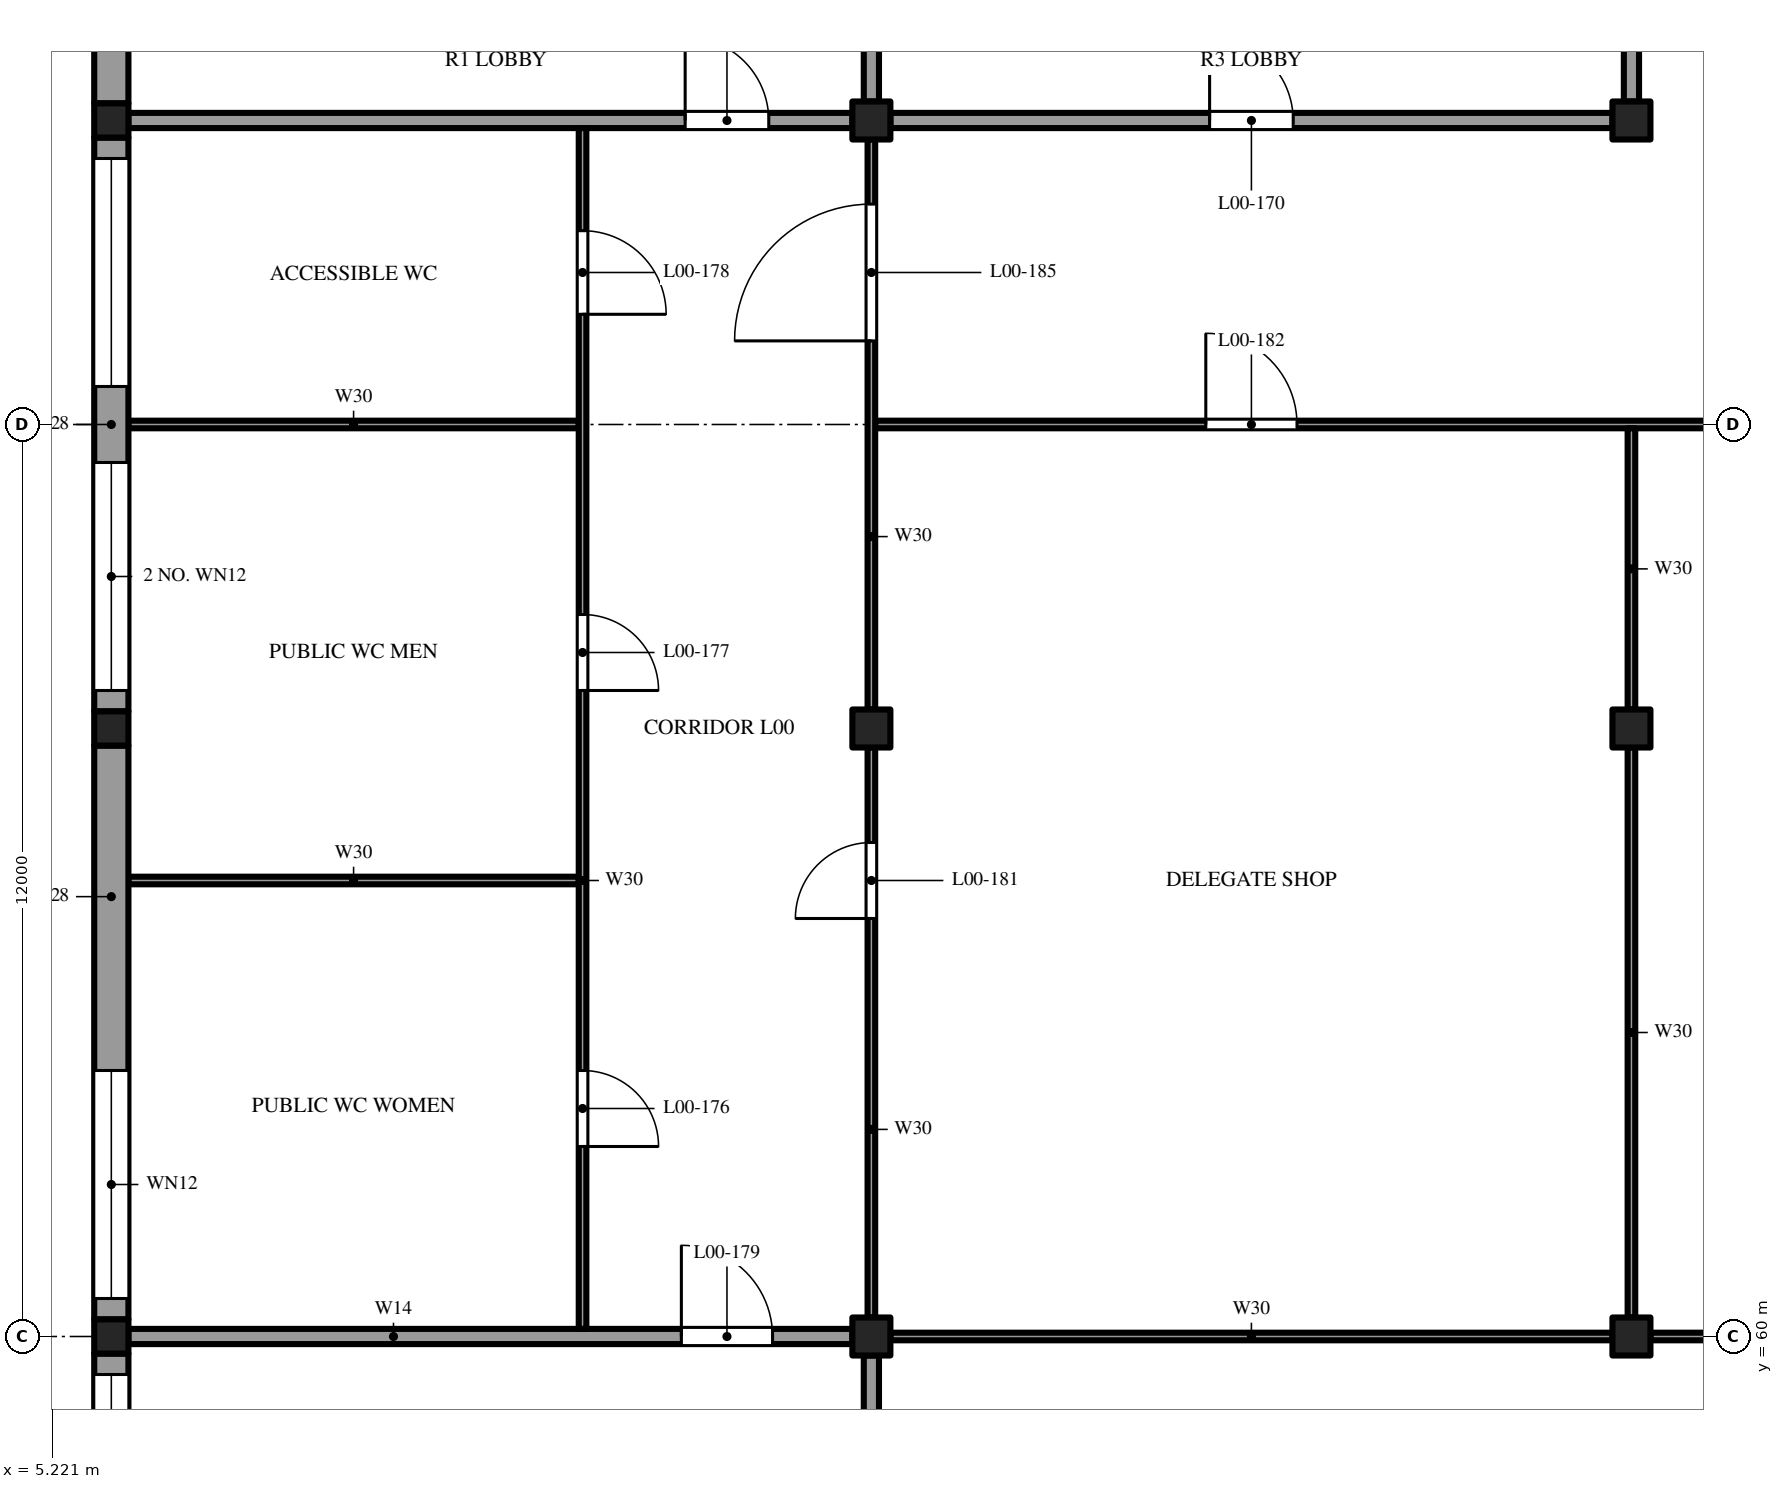
"""IFC4 building model, lengths in metres.
Left out: names, types, materials, properties, quantities, classifications, styles, units other than length and angle.
Written with IfcOpenShell. Run it as: python <this file> out.ifc"""

import sys

from ifc_helpers import new_model, si_unit, direction, frame, frame_2d, origin, origin_2d, place, context, subcontext, project, spatial, rectangle, extrude, element, fill, save


model = new_model("IFC4")
c1 = context("Model", 3, precision=1e-05, world=origin(), true_north=direction((0.0, 1.0)))
c2 = subcontext(c1, "Body", "Model", "MODEL_VIEW")
j1 = project(units=[si_unit("LENGTHUNIT", "METRE"), si_unit("PLANEANGLEUNIT", "RADIAN")], contexts=[c1])
p1 = place(None, origin())
s1 = spatial("IfcSite", under=j1, at=p1, CompositionType="ELEMENT")
p2 = place(p1, origin())
s2 = spatial("IfcBuilding", under=s1, at=p2, CompositionType="ELEMENT")
p3 = place(p2, origin())
s3 = spatial("IfcBuildingStorey", under=s2, at=p3, CompositionType="ELEMENT", Elevation=0.0)
for number, where, z_axis, x_axis in (
    (1, (6.0, 60.0, -0.4), (0.0, 0.0, 1.0), (1.0, 0.0, 0.0)),
    (2, (6.0, 68.0, -0.4), (0.0, 0.0, 1.0), (1.0, 0.0, 0.0)),
    (3, (6.0, 76.0, -0.4), (0.0, 0.0, 1.0), (1.0, 0.0, 0.0)),
):
    element("IfcColumn", number, at=place(p3, frame(where, z_axis=z_axis, x_axis=x_axis)), inside=s3, PredefinedType="COLUMN", context=c2, shape_type="SweptSolid", body=[
        extrude(rectangle(XDim=0.45, YDim=0.45, at=origin_2d()), origin(), (0.0, 0.0, 1.0), 7.6),
    ])
for number, where, z_axis, x_axis in (
    (4, (16.0, 60.0, -0.4), (0.0, 0.0, 1.0), (1.0, 0.0, 0.0)),
    (5, (16.0, 68.0, -0.4), (0.0, 0.0, 1.0), (1.0, 0.0, 0.0)),
    (6, (16.0, 76.0, -0.4), (0.0, 0.0, 1.0), (1.0, 0.0, 0.0)),
    (7, (26.0, 60.0, -0.4), (0.0, 0.0, 1.0), (1.0, 0.0, 0.0)),
    (8, (26.0, 68.0, -0.4), (0.0, 0.0, 1.0), (1.0, 0.0, 0.0)),
    (9, (26.0, 76.0, -0.4), (0.0, 0.0, 1.0), (1.0, 0.0, 0.0)),
):
    element("IfcColumn", number, at=place(p3, frame(where, z_axis=z_axis, x_axis=x_axis)), inside=s3, PredefinedType="COLUMN", context=c2, shape_type="SweptSolid", body=[
        extrude(rectangle(XDim=0.5, YDim=0.5, at=origin_2d()), origin(), (0.0, 0.0, 1.0), 7.6),
    ])
p4 = place(p3, frame((6.225, 60.0, 0.0), z_axis=(0.0, 0.0, 1.0), x_axis=(1.0, 0.0, 0.0)))
e10 = element("IfcWall", 10, at=p4, inside=s3, PredefinedType="SOLIDWALL", context=c2, shape_type="SweptSolid", body=[
    extrude(rectangle(XDim=9.525, YDim=0.2, at=frame_2d((4.762, 0.0))), origin(), (0.0, 0.0, 1.0), 6.85),
])
p5 = place(p4, frame((7.275, 0.0, 0.0)))
e11 = element("IfcOpeningElement", 11, at=p5, cuts=e10, PredefinedType="OPENING", context=c2, shape_type="SweptSolid", body=[
    extrude(rectangle(XDim=1.2, YDim=2.1, at=frame_2d((0.6, 1.05))), frame((0.0, 0.11, 0.0), z_axis=(0.0, -1.0, 0.0), x_axis=(1.0, 0.0, 0.0)), (0.0, 0.0, 1.0), 0.22),
])
for number, where, z_axis, x_axis in (
    (12, (16.25, 60.0, 0.0), (0.0, 0.0, 1.0), (1.0, 0.0, 0.0)),
    (13, (26.25, 60.0, 0.0), (0.0, 0.0, 1.0), (1.0, 0.0, 0.0)),
):
    element("IfcWall", number, at=place(p3, frame(where, z_axis=z_axis, x_axis=x_axis)), inside=s3, PredefinedType="PARTITIONING", context=c2, shape_type="SweptSolid", body=[
        extrude(rectangle(XDim=9.5, YDim=0.1, at=frame_2d((4.75, 0.0))), origin(), (0.0, 0.0, 1.0), 6.85),
    ])
for number, where, z_axis, x_axis in (
    (14, (6.225, 66.0, 0.0), (0.0, 0.0, 1.0), (1.0, 0.0, 0.0)),
    (15, (6.225, 72.0, 0.0), (0.0, 0.0, 1.0), (1.0, 0.0, 0.0)),
):
    element("IfcWall", number, at=place(p3, frame(where, z_axis=z_axis, x_axis=x_axis)), inside=s3, PredefinedType="PARTITIONING", context=c2, shape_type="SweptSolid", body=[
        extrude(rectangle(XDim=5.925, YDim=0.1, at=frame_2d((2.962, 0.0))), origin(), (0.0, 0.0, 1.0), 6.85),
    ])
p6 = place(p3, frame((16.05, 72.0, 0.0), z_axis=(0.0, 0.0, 1.0), x_axis=(1.0, 0.0, 0.0)))
e16 = element("IfcWall", 16, at=p6, inside=s3, PredefinedType="PARTITIONING", context=c2, shape_type="SweptSolid", body=[
    extrude(rectangle(XDim=29.725, YDim=0.1, at=frame_2d((14.862, 0.0))), origin(), (0.0, 0.0, 1.0), 6.85),
])
p7 = place(p6, frame((4.35, 0.0, 0.0)))
e17 = element("IfcOpeningElement", 17, at=p7, cuts=e16, PredefinedType="OPENING", context=c2, shape_type="SweptSolid", body=[
    extrude(rectangle(XDim=1.2, YDim=2.1, at=frame_2d((0.6, 1.05))), frame((0.0, 0.06, 0.0), z_axis=(0.0, -1.0, 0.0), x_axis=(1.0, 0.0, 0.0)), (0.0, 0.0, 1.0), 0.12),
])
p8 = place(p6, frame((17.55, 0.0, 0.0)))
e18 = element("IfcOpeningElement", 18, at=p8, cuts=e16, PredefinedType="OPENING", context=c2, shape_type="SweptSolid", body=[
    extrude(rectangle(XDim=1.8, YDim=2.1, at=frame_2d((0.9, 1.05))), frame((0.0, 0.06, 0.0), z_axis=(0.0, -1.0, 0.0), x_axis=(1.0, 0.0, 0.0)), (0.0, 0.0, 1.0), 0.12),
])
p9 = place(p3, frame((6.225, 76.0, 0.0), z_axis=(0.0, 0.0, 1.0), x_axis=(1.0, 0.0, 0.0)))
e19 = element("IfcWall", 19, at=p9, inside=s3, PredefinedType="SOLIDWALL", context=c2, shape_type="SweptSolid", body=[
    extrude(rectangle(XDim=9.525, YDim=0.2, at=frame_2d((4.762, 0.0))), origin(), (0.0, 0.0, 1.0), 6.85),
])
p10 = place(p9, frame((7.325, 0.0, 0.0)))
e20 = element("IfcOpeningElement", 20, at=p10, cuts=e19, PredefinedType="OPENING", context=c2, shape_type="SweptSolid", body=[
    extrude(rectangle(XDim=1.1, YDim=2.1, at=frame_2d((0.55, 1.05))), frame((0.0, 0.11, 0.0), z_axis=(0.0, -1.0, 0.0), x_axis=(1.0, 0.0, 0.0)), (0.0, 0.0, 1.0), 0.22),
])
p11 = place(p3, frame((16.25, 76.0, 0.0), z_axis=(0.0, 0.0, 1.0), x_axis=(1.0, 0.0, 0.0)))
e21 = element("IfcWall", 21, at=p11, inside=s3, PredefinedType="SOLIDWALL", context=c2, shape_type="SweptSolid", body=[
    extrude(rectangle(XDim=9.5, YDim=0.2, at=frame_2d((4.75, 0.0))), origin(), (0.0, 0.0, 1.0), 6.85),
])
p12 = place(p11, frame((4.2, 0.0, 0.0)))
e22 = element("IfcOpeningElement", 22, at=p12, cuts=e21, PredefinedType="OPENING", context=c2, shape_type="SweptSolid", body=[
    extrude(rectangle(XDim=1.1, YDim=2.1, at=frame_2d((0.55, 1.05))), frame((0.0, 0.11, 0.0), z_axis=(0.0, -1.0, 0.0), x_axis=(1.0, 0.0, 0.0)), (0.0, 0.0, 1.0), 0.22),
])
p13 = place(p3, frame((6.0, 59.775, 0.0), z_axis=(0.0, 0.0, 1.0), x_axis=(0.0, -1.0, 0.0)))
e23 = element("IfcWall", 23, at=p13, inside=s3, PredefinedType="SOLIDWALL", context=c2, shape_type="SweptSolid", body=[
    extrude(rectangle(XDim=7.55, YDim=0.45, at=frame_2d((3.775, 0.0))), origin(), (0.0, 0.0, 1.0), 6.85),
])
p14 = place(p13, frame((4.275, 0.0, 1.0)))
e24 = element("IfcOpeningElement", 24, at=p14, cuts=e23, PredefinedType="OPENING", context=c2, shape_type="SweptSolid", body=[
    extrude(rectangle(XDim=3.0, YDim=4.0, at=frame_2d((1.5, 2.0))), frame((0.0, 0.235, 0.0), z_axis=(0.0, -1.0, 0.0), x_axis=(1.0, 0.0, 0.0)), (0.0, 0.0, 1.0), 0.47),
])
p15 = place(p13, frame((0.275, 0.0, 1.0)))
e25 = element("IfcOpeningElement", 25, at=p15, cuts=e23, PredefinedType="OPENING", context=c2, shape_type="SweptSolid", body=[
    extrude(rectangle(XDim=3.0, YDim=4.0, at=frame_2d((1.5, 2.0))), frame((0.0, 0.235, 0.0), z_axis=(0.0, -1.0, 0.0), x_axis=(1.0, 0.0, 0.0)), (0.0, 0.0, 1.0), 0.47),
])
p16 = place(p3, frame((6.0, 67.775, 0.0), z_axis=(0.0, 0.0, 1.0), x_axis=(0.0, -1.0, 0.0)))
e26 = element("IfcWall", 26, at=p16, inside=s3, PredefinedType="SOLIDWALL", context=c2, shape_type="SweptSolid", body=[
    extrude(rectangle(XDim=7.55, YDim=0.45, at=frame_2d((3.775, 0.0))), origin(), (0.0, 0.0, 1.0), 6.85),
])
p17 = place(p16, frame((4.275, 0.0, 1.0)))
e27 = element("IfcOpeningElement", 27, at=p17, cuts=e26, PredefinedType="OPENING", context=c2, shape_type="SweptSolid", body=[
    extrude(rectangle(XDim=3.0, YDim=4.0, at=frame_2d((1.5, 2.0))), frame((0.0, 0.235, 0.0), z_axis=(0.0, -1.0, 0.0), x_axis=(1.0, 0.0, 0.0)), (0.0, 0.0, 1.0), 0.47),
])
p18 = place(p3, frame((6.0, 75.775, 0.0), z_axis=(0.0, 0.0, 1.0), x_axis=(0.0, -1.0, 0.0)))
e28 = element("IfcWall", 28, at=p18, inside=s3, PredefinedType="SOLIDWALL", context=c2, shape_type="SweptSolid", body=[
    extrude(rectangle(XDim=7.55, YDim=0.45, at=frame_2d((3.775, 0.0))), origin(), (0.0, 0.0, 1.0), 6.85),
])
p19 = place(p18, frame((4.275, 0.0, 1.0)))
e29 = element("IfcOpeningElement", 29, at=p19, cuts=e28, PredefinedType="OPENING", context=c2, shape_type="SweptSolid", body=[
    extrude(rectangle(XDim=3.0, YDim=4.0, at=frame_2d((1.5, 2.0))), frame((0.0, 0.235, 0.0), z_axis=(0.0, -1.0, 0.0), x_axis=(1.0, 0.0, 0.0)), (0.0, 0.0, 1.0), 0.47),
])
p20 = place(p18, frame((0.275, 0.0, 1.0)))
e30 = element("IfcOpeningElement", 30, at=p20, cuts=e28, PredefinedType="OPENING", context=c2, shape_type="SweptSolid", body=[
    extrude(rectangle(XDim=3.0, YDim=4.0, at=frame_2d((1.5, 2.0))), frame((0.0, 0.235, 0.0), z_axis=(0.0, -1.0, 0.0), x_axis=(1.0, 0.0, 0.0)), (0.0, 0.0, 1.0), 0.47),
])
p21 = place(p3, frame((6.0, 83.775, 0.0), z_axis=(0.0, 0.0, 1.0), x_axis=(0.0, -1.0, 0.0)))
e31 = element("IfcWall", 31, at=p21, inside=s3, PredefinedType="SOLIDWALL", context=c2, shape_type="SweptSolid", body=[
    extrude(rectangle(XDim=7.55, YDim=0.45, at=frame_2d((3.775, 0.0))), origin(), (0.0, 0.0, 1.0), 6.85),
])
p22 = place(p3, frame((12.2, 60.1, 0.0), z_axis=(0.0, 0.0, 1.0), x_axis=(0.0, 1.0, 0.0)))
e32 = element("IfcWall", 32, at=p22, inside=s3, PredefinedType="PARTITIONING", context=c2, shape_type="SweptSolid", body=[
    extrude(rectangle(XDim=15.8, YDim=0.1, at=frame_2d((7.9, 0.0))), origin(), (0.0, 0.0, 1.0), 6.85),
])
p23 = place(p22, frame((2.4, 0.0, 0.0)))
e33 = element("IfcOpeningElement", 33, at=p23, cuts=e32, PredefinedType="OPENING", context=c2, shape_type="SweptSolid", body=[
    extrude(rectangle(XDim=1.0, YDim=2.1, at=frame_2d((0.5, 1.05))), frame((0.0, 0.06, 0.0), z_axis=(0.0, -1.0, 0.0), x_axis=(1.0, 0.0, 0.0)), (0.0, 0.0, 1.0), 0.12),
])
p24 = place(p22, frame((8.4, 0.0, 0.0)))
e34 = element("IfcOpeningElement", 34, at=p24, cuts=e32, PredefinedType="OPENING", context=c2, shape_type="SweptSolid", body=[
    extrude(rectangle(XDim=1.0, YDim=2.1, at=frame_2d((0.5, 1.05))), frame((0.0, 0.06, 0.0), z_axis=(0.0, -1.0, 0.0), x_axis=(1.0, 0.0, 0.0)), (0.0, 0.0, 1.0), 0.12),
])
p25 = place(p22, frame((13.35, 0.0, 0.0)))
e35 = element("IfcOpeningElement", 35, at=p25, cuts=e32, PredefinedType="OPENING", context=c2, shape_type="SweptSolid", body=[
    extrude(rectangle(XDim=1.1, YDim=2.1, at=frame_2d((0.55, 1.05))), frame((0.0, 0.06, 0.0), z_axis=(0.0, -1.0, 0.0), x_axis=(1.0, 0.0, 0.0)), (0.0, 0.0, 1.0), 0.12),
])
p26 = place(p3, frame((16.0, 52.25, 0.0), z_axis=(0.0, 0.0, 1.0), x_axis=(0.0, 1.0, 0.0)))
e36 = element("IfcWall", 36, at=p26, inside=s3, PredefinedType="SOLIDWALL", context=c2, shape_type="SweptSolid", body=[
    extrude(rectangle(XDim=7.5, YDim=0.2, at=frame_2d((3.75, 0.0))), origin(), (0.0, 0.0, 1.0), 6.85),
])
p27 = place(p3, frame((16.0, 60.25, 0.0), z_axis=(0.0, 0.0, 1.0), x_axis=(0.0, 1.0, 0.0)))
e37 = element("IfcWall", 37, at=p27, inside=s3, PredefinedType="PARTITIONING", context=c2, shape_type="SweptSolid", body=[
    extrude(rectangle(XDim=7.5, YDim=0.1, at=frame_2d((3.75, 0.0))), origin(), (0.0, 0.0, 1.0), 6.85),
])
p28 = place(p27, frame((5.25, 0.0, 0.0)))
e38 = element("IfcOpeningElement", 38, at=p28, cuts=e37, PredefinedType="OPENING", context=c2, shape_type="SweptSolid", body=[
    extrude(rectangle(XDim=1.0, YDim=2.1, at=frame_2d((0.5, 1.05))), frame((0.0, 0.06, 0.0), z_axis=(0.0, -1.0, 0.0), x_axis=(1.0, 0.0, 0.0)), (0.0, 0.0, 1.0), 0.12),
])
p29 = place(p3, frame((16.0, 68.25, 0.0), z_axis=(0.0, 0.0, 1.0), x_axis=(0.0, 1.0, 0.0)))
e39 = element("IfcWall", 39, at=p29, inside=s3, PredefinedType="PARTITIONING", context=c2, shape_type="SweptSolid", body=[
    extrude(rectangle(XDim=7.5, YDim=0.1, at=frame_2d((3.75, 0.0))), origin(), (0.0, 0.0, 1.0), 6.85),
])
p30 = place(p29, frame((4.85, 0.0, 0.0)))
e40 = element("IfcOpeningElement", 40, at=p30, cuts=e39, PredefinedType="OPENING", context=c2, shape_type="SweptSolid", body=[
    extrude(rectangle(XDim=1.8, YDim=2.1, at=frame_2d((0.9, 1.05))), frame((0.0, 0.06, 0.0), z_axis=(0.0, -1.0, 0.0), x_axis=(1.0, 0.0, 0.0)), (0.0, 0.0, 1.0), 0.12),
])
p31 = place(p3, frame((16.0, 76.25, 0.0), z_axis=(0.0, 0.0, 1.0), x_axis=(0.0, 1.0, 0.0)))
e41 = element("IfcWall", 41, at=p31, inside=s3, PredefinedType="SOLIDWALL", context=c2, shape_type="SweptSolid", body=[
    extrude(rectangle(XDim=2.275, YDim=0.2, at=frame_2d((1.137, 0.0))), origin(), (0.0, 0.0, 1.0), 6.85),
])
p32 = place(p3, frame((26.0, 60.25, 0.0), z_axis=(0.0, 0.0, 1.0), x_axis=(0.0, 1.0, 0.0)))
e42 = element("IfcWall", 42, at=p32, inside=s3, PredefinedType="PARTITIONING", context=c2, shape_type="SweptSolid", body=[
    extrude(rectangle(XDim=7.5, YDim=0.1, at=frame_2d((3.75, 0.0))), origin(), (0.0, 0.0, 1.0), 6.85),
])
p33 = place(p3, frame((26.0, 68.25, 0.0), z_axis=(0.0, 0.0, 1.0), x_axis=(0.0, 1.0, 0.0)))
e43 = element("IfcWall", 43, at=p33, inside=s3, PredefinedType="PARTITIONING", context=c2, shape_type="SweptSolid", body=[
    extrude(rectangle(XDim=3.7, YDim=0.1, at=frame_2d((1.85, 0.0))), origin(), (0.0, 0.0, 1.0), 6.85),
])
p34 = place(p3, frame((26.0, 76.25, 0.0), z_axis=(0.0, 0.0, 1.0), x_axis=(0.0, 1.0, 0.0)))
e44 = element("IfcWall", 44, at=p34, inside=s3, PredefinedType="SOLIDWALL", context=c2, shape_type="SweptSolid", body=[
    extrude(rectangle(XDim=2.275, YDim=0.2, at=frame_2d((1.137, 0.0))), origin(), (0.0, 0.0, 1.0), 6.85),
])
p35 = place(p10, origin())
e45 = element("IfcDoor", 45, at=p35, inside=s3, OperationType="SINGLE_SWING_LEFT", PredefinedType="DOOR", context=c2, shape_type="SweptSolid", body=[
    extrude(rectangle(XDim=1.1, YDim=2.1, at=frame_2d((0.55, 1.05))), frame((0.0, 0.025, 0.0), z_axis=(0.0, -1.0, 0.0), x_axis=(1.0, 0.0, 0.0)), (0.0, 0.0, 1.0), 0.05),
])
fill(e20, e45)
p36 = place(p12, origin())
e46 = element("IfcDoor", 46, at=p36, inside=s3, OperationType="SINGLE_SWING_LEFT", PredefinedType="DOOR", context=c2, shape_type="SweptSolid", body=[
    extrude(rectangle(XDim=1.1, YDim=2.1, at=frame_2d((0.55, 1.05))), frame((0.0, 0.025, 0.0), z_axis=(0.0, -1.0, 0.0), x_axis=(1.0, 0.0, 0.0)), (0.0, 0.0, 1.0), 0.05),
])
fill(e22, e46)
p37 = place(p23, frame((1.0, 0.0, 0.0), z_axis=(0.0, 0.0, 1.0), x_axis=(-1.0, 0.0, 0.0)))
e47 = element("IfcDoor", 47, at=p37, inside=s3, OperationType="SINGLE_SWING_RIGHT", PredefinedType="DOOR", context=c2, shape_type="SweptSolid", body=[
    extrude(rectangle(XDim=1.0, YDim=2.1, at=frame_2d((0.5, 1.05))), frame((0.0, 0.025, 0.0), z_axis=(0.0, -1.0, 0.0), x_axis=(1.0, 0.0, 0.0)), (0.0, 0.0, 1.0), 0.05),
])
fill(e33, e47)
p38 = place(p24, frame((1.0, 0.0, 0.0), z_axis=(0.0, 0.0, 1.0), x_axis=(-1.0, 0.0, 0.0)))
e48 = element("IfcDoor", 48, at=p38, inside=s3, OperationType="SINGLE_SWING_LEFT", PredefinedType="DOOR", context=c2, shape_type="SweptSolid", body=[
    extrude(rectangle(XDim=1.0, YDim=2.1, at=frame_2d((0.5, 1.05))), frame((0.0, 0.025, 0.0), z_axis=(0.0, -1.0, 0.0), x_axis=(1.0, 0.0, 0.0)), (0.0, 0.0, 1.0), 0.05),
])
fill(e34, e48)
p39 = place(p25, frame((1.1, 0.0, 0.0), z_axis=(0.0, 0.0, 1.0), x_axis=(-1.0, 0.0, 0.0)))
e49 = element("IfcDoor", 49, at=p39, inside=s3, OperationType="SINGLE_SWING_RIGHT", PredefinedType="DOOR", context=c2, shape_type="SweptSolid", body=[
    extrude(rectangle(XDim=1.1, YDim=2.1, at=frame_2d((0.55, 1.05))), frame((0.0, 0.025, 0.0), z_axis=(0.0, -1.0, 0.0), x_axis=(1.0, 0.0, 0.0)), (0.0, 0.0, 1.0), 0.05),
])
fill(e35, e49)
p40 = place(p5, origin())
e50 = element("IfcDoor", 50, at=p40, inside=s3, OperationType="SINGLE_SWING_RIGHT", PredefinedType="DOOR", context=c2, shape_type="SweptSolid", body=[
    extrude(rectangle(XDim=1.2, YDim=2.1, at=frame_2d((0.6, 1.05))), frame((0.0, 0.025, 0.0), z_axis=(0.0, -1.0, 0.0), x_axis=(1.0, 0.0, 0.0)), (0.0, 0.0, 1.0), 0.05),
])
fill(e11, e50)
p41 = place(p28, origin())
e51 = element("IfcDoor", 51, at=p41, inside=s3, OperationType="SINGLE_SWING_RIGHT", PredefinedType="DOOR", context=c2, shape_type="SweptSolid", body=[
    extrude(rectangle(XDim=1.0, YDim=2.1, at=frame_2d((0.5, 1.05))), frame((0.0, 0.025, 0.0), z_axis=(0.0, -1.0, 0.0), x_axis=(1.0, 0.0, 0.0)), (0.0, 0.0, 1.0), 0.05),
])
fill(e38, e51)
p42 = place(p7, origin())
e52 = element("IfcDoor", 52, at=p42, inside=s3, OperationType="SINGLE_SWING_LEFT", PredefinedType="DOOR", context=c2, shape_type="SweptSolid", body=[
    extrude(rectangle(XDim=1.2, YDim=2.1, at=frame_2d((0.6, 1.05))), frame((0.0, 0.025, 0.0), z_axis=(0.0, -1.0, 0.0), x_axis=(1.0, 0.0, 0.0)), (0.0, 0.0, 1.0), 0.05),
])
fill(e17, e52)
p43 = place(p30, origin())
e53 = element("IfcDoor", 53, at=p43, inside=s3, OperationType="DOUBLE_DOOR_SINGLE_SWING", PredefinedType="DOOR", context=c2, shape_type="SweptSolid", body=[
    extrude(rectangle(XDim=1.8, YDim=2.1, at=frame_2d((0.9, 1.05))), frame((0.0, 0.025, 0.0), z_axis=(0.0, -1.0, 0.0), x_axis=(1.0, 0.0, 0.0)), (0.0, 0.0, 1.0), 0.05),
])
fill(e40, e53)
p44 = place(p15, origin())
e54 = element("IfcWindow", 54, at=p44, inside=s3, PartitioningType="SINGLE_PANEL", PredefinedType="WINDOW", context=c2, shape_type="SweptSolid", body=[
    extrude(rectangle(XDim=3.0, YDim=4.0, at=frame_2d((1.5, 2.0))), frame((0.0, 0.215, 0.0), z_axis=(0.0, -1.0, 0.0), x_axis=(1.0, 0.0, 0.0)), (0.0, 0.0, 1.0), 0.06),
])
fill(e25, e54)
p45 = place(p17, origin())
e55 = element("IfcWindow", 55, at=p45, inside=s3, PartitioningType="SINGLE_PANEL", PredefinedType="WINDOW", context=c2, shape_type="SweptSolid", body=[
    extrude(rectangle(XDim=3.0, YDim=4.0, at=frame_2d((1.5, 2.0))), frame((0.0, 0.215, 0.0), z_axis=(0.0, -1.0, 0.0), x_axis=(1.0, 0.0, 0.0)), (0.0, 0.0, 1.0), 0.06),
])
fill(e27, e55)
p46 = place(p19, origin())
e56 = element("IfcWindow", 56, at=p46, inside=s3, PartitioningType="SINGLE_PANEL", PredefinedType="WINDOW", context=c2, shape_type="SweptSolid", body=[
    extrude(rectangle(XDim=3.0, YDim=4.0, at=frame_2d((1.5, 2.0))), frame((0.0, 0.215, 0.0), z_axis=(0.0, -1.0, 0.0), x_axis=(1.0, 0.0, 0.0)), (0.0, 0.0, 1.0), 0.06),
])
fill(e29, e56)
p47 = place(p20, origin())
e57 = element("IfcWindow", 57, at=p47, inside=s3, PartitioningType="SINGLE_PANEL", PredefinedType="WINDOW", context=c2, shape_type="SweptSolid", body=[
    extrude(rectangle(XDim=3.0, YDim=4.0, at=frame_2d((1.5, 2.0))), frame((0.0, 0.215, 0.0), z_axis=(0.0, -1.0, 0.0), x_axis=(1.0, 0.0, 0.0)), (0.0, 0.0, 1.0), 0.06),
])
fill(e30, e57)
save(model, sys.argv[1])
